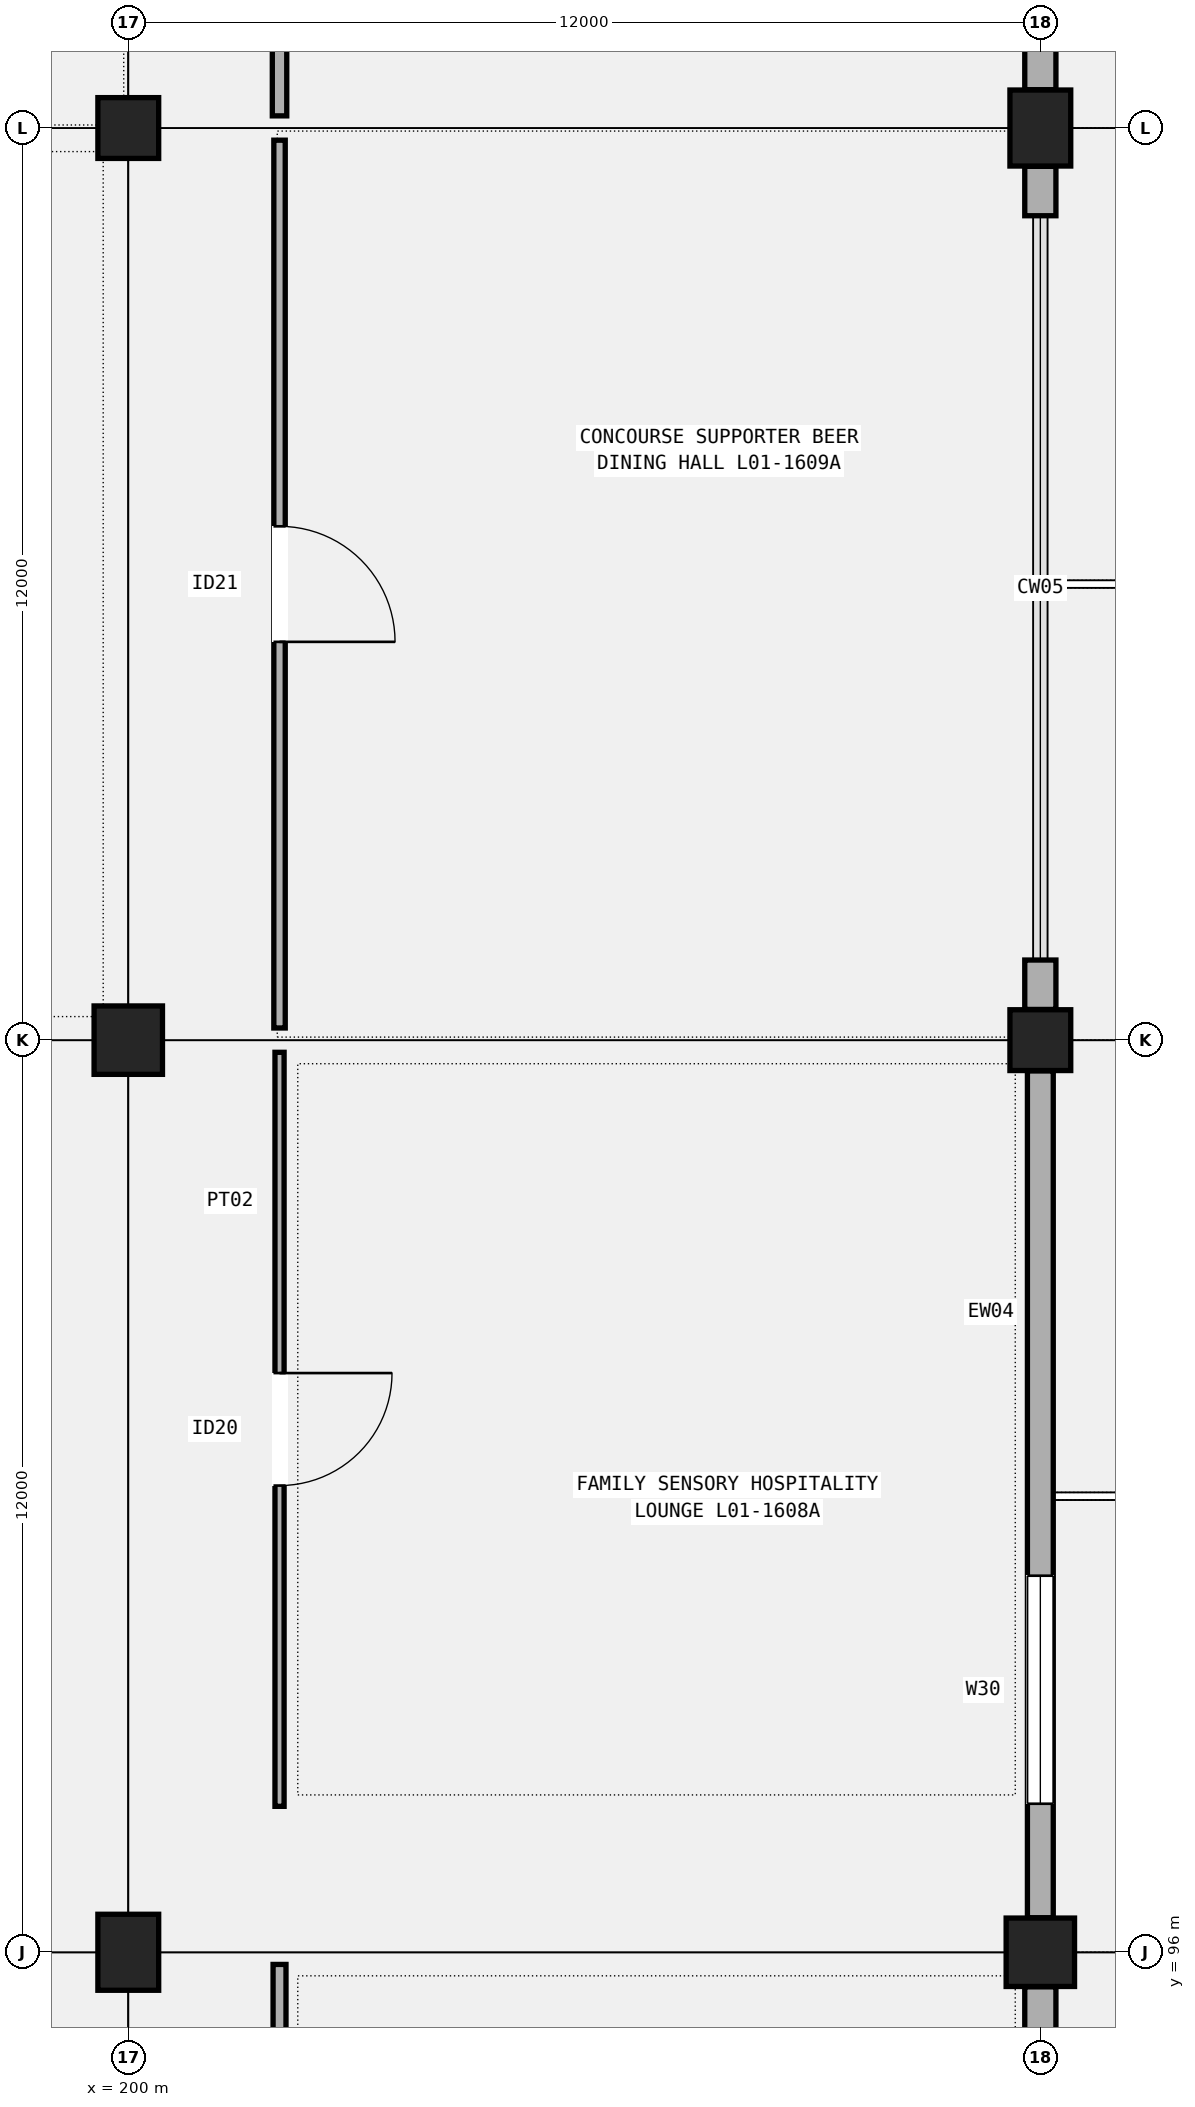
"""IFC4 building model, lengths in metres.
Left out: names, types, materials, properties, quantities, classifications, styles, units other than length and angle.
Written with IfcOpenShell. Run it as: python <this file> out.ifc"""

import sys

from ifc_helpers import new_model, si_unit, direction, frame, frame_2d, origin, origin_2d, place, context, subcontext, project, spatial, rectangle, extrude, element, fill, save


model = new_model("IFC4")
c1 = context("Model", 3, precision=1e-05, world=origin(), true_north=direction((0.0, 1.0)))
c2 = subcontext(c1, "Body", "Model", "MODEL_VIEW")
j1 = project(units=[si_unit("LENGTHUNIT", "METRE"), si_unit("PLANEANGLEUNIT", "RADIAN")], contexts=[c1])
p1 = place(None, origin())
s1 = spatial("IfcSite", under=j1, at=p1, CompositionType="ELEMENT")
p2 = place(p1, origin())
s2 = spatial("IfcBuilding", under=s1, at=p2, CompositionType="ELEMENT")
p3 = place(p2, frame((0.0, 0.0, 5.4)))
s3 = spatial("IfcBuildingStorey", under=s2, at=p3, CompositionType="ELEMENT", Elevation=5.4)
p4 = place(p3, frame((200.0, 96.0, 0.0), z_axis=(0.0, 0.0, 1.0), x_axis=(1.0, 0.0, 0.0)))
e1 = element("IfcColumn", 1, at=p4, inside=s3, PredefinedType="COLUMN", context=c2, shape_type="SweptSolid", body=[
    extrude(rectangle(XDim=0.8, YDim=1.0, at=origin_2d()), origin(), (0.0, 0.0, 1.0), 4.8),
])
p5 = place(p3, frame((200.0, 108.0, 0.0), z_axis=(0.0, 0.0, 1.0), x_axis=(1.0, 0.0, 0.0)))
e2 = element("IfcColumn", 2, at=p5, inside=s3, PredefinedType="COLUMN", context=c2, shape_type="SweptSolid", body=[
    extrude(rectangle(XDim=0.9, YDim=0.9, at=origin_2d()), origin(), (0.0, 0.0, 1.0), 4.8),
])
p6 = place(p3, frame((200.0, 120.0, 0.0), z_axis=(0.0, 0.0, 1.0), x_axis=(1.0, 0.0, 0.0)))
e3 = element("IfcColumn", 3, at=p6, inside=s3, PredefinedType="COLUMN", context=c2, shape_type="SweptSolid", body=[
    extrude(rectangle(XDim=0.8, YDim=0.8, at=origin_2d()), origin(), (0.0, 0.0, 1.0), 4.8),
])
p7 = place(p3, frame((212.0, 96.0, 0.0), z_axis=(0.0, 0.0, 1.0), x_axis=(1.0, 0.0, 0.0)))
e4 = element("IfcColumn", 4, at=p7, inside=s3, PredefinedType="COLUMN", context=c2, shape_type="SweptSolid", body=[
    extrude(rectangle(XDim=0.9, YDim=0.9, at=origin_2d()), origin(), (0.0, 0.0, 1.0), 4.8),
])
p8 = place(p3, frame((212.0, 108.0, 0.0), z_axis=(0.0, 0.0, 1.0), x_axis=(1.0, 0.0, 0.0)))
e5 = element("IfcColumn", 5, at=p8, inside=s3, PredefinedType="COLUMN", context=c2, shape_type="SweptSolid", body=[
    extrude(rectangle(XDim=0.8, YDim=0.8, at=origin_2d()), origin(), (0.0, 0.0, 1.0), 4.8),
])
p9 = place(p3, frame((212.0, 120.0, 0.0), z_axis=(0.0, 0.0, 1.0), x_axis=(1.0, 0.0, 0.0)))
e6 = element("IfcColumn", 6, at=p9, inside=s3, PredefinedType="COLUMN", context=c2, shape_type="SweptSolid", body=[
    extrude(rectangle(XDim=0.8, YDim=1.0, at=origin_2d()), origin(), (0.0, 0.0, 1.0), 4.8),
])
p10 = place(p3, frame((212.0, 94.896, 0.0), z_axis=(0.0, 0.0, 1.0), x_axis=(0.0, 1.0, 0.0)))
e7 = element("IfcWall", 7, at=p10, inside=s3, PredefinedType="SOLIDWALL", context=c2, shape_type="SweptSolid", body=[
    extrude(rectangle(XDim=0.65, YDim=0.41, at=frame_2d((0.325, 0.0))), origin(), (0.0, 0.0, 1.0), 4.15),
])
p11 = place(p3, frame((212.0, 96.454, 0.0), z_axis=(0.0, 0.0, 1.0), x_axis=(0.0, 1.0, 0.0)))
e8 = element("IfcWall", 8, at=p11, inside=s3, PredefinedType="SOLIDWALL", context=c2, shape_type="SweptSolid", body=[
    extrude(rectangle(XDim=11.142, YDim=0.34, at=frame_2d((5.571, 0.0))), origin(), (0.0, 0.0, 1.0), 4.2),
])
p12 = place(p11, frame((1.5, 0.0, 0.95)))
e9 = element("IfcOpeningElement", 9, at=p12, cuts=e8, PredefinedType="OPENING", context=c2, shape_type="SweptSolid", body=[
    extrude(rectangle(XDim=3.0, YDim=1.7, at=frame_2d((1.5, 0.85))), frame((0.0, 0.18, 0.0), z_axis=(0.0, -1.0, 0.0), x_axis=(1.0, 0.0, 0.0)), (0.0, 0.0, 1.0), 0.36),
])
p13 = place(p3, frame((212.0, 108.404, 0.0), z_axis=(0.0, 0.0, 1.0), x_axis=(0.0, 1.0, 0.0)))
e10 = element("IfcWall", 10, at=p13, inside=s3, PredefinedType="SOLIDWALL", context=c2, shape_type="SweptSolid", body=[
    extrude(rectangle(XDim=0.65, YDim=0.41, at=frame_2d((0.325, 0.0))), origin(), (0.0, 0.0, 1.0), 4.15),
])
p14 = place(p3, frame((212.0, 118.846, 0.0), z_axis=(0.0, 0.0, 1.0), x_axis=(0.0, 1.0, 0.0)))
e11 = element("IfcWall", 11, at=p14, inside=s3, PredefinedType="SOLIDWALL", context=c2, shape_type="SweptSolid", body=[
    extrude(rectangle(XDim=0.65, YDim=0.41, at=frame_2d((0.325, 0.0))), origin(), (0.0, 0.0, 1.0), 4.15),
])
p15 = place(p3, frame((212.0, 120.504, 0.0), z_axis=(0.0, 0.0, 1.0), x_axis=(0.0, 1.0, 0.0)))
e12 = element("IfcWall", 12, at=p15, inside=s3, PredefinedType="SOLIDWALL", context=c2, shape_type="SweptSolid", body=[
    extrude(rectangle(XDim=0.65, YDim=0.41, at=frame_2d((0.325, 0.0))), origin(), (0.0, 0.0, 1.0), 4.2),
])
p16 = place(p3, frame((201.99, 84.16, 0.0), z_axis=(0.0, 0.0, 1.0), x_axis=(0.0, 1.0, 0.0)))
e13 = element("IfcWall", 13, at=p16, inside=s3, PredefinedType="PARTITIONING", context=c2, shape_type="SweptSolid", body=[
    extrude(rectangle(XDim=11.68, YDim=0.17, at=frame_2d((5.84, 0.0))), origin(), (0.0, 0.0, 1.0), 3.92),
])
p17 = place(p16, frame((6.56, 0.0, 0.0), z_axis=(0.0, 0.0, 1.0), x_axis=(-1.0, 0.0, 0.0)))
e14 = element("IfcOpeningElement", 14, at=p17, cuts=e13, PredefinedType="OPENING", context=c2, shape_type="SweptSolid", body=[
    extrude(rectangle(XDim=1.44, YDim=2.26, at=frame_2d((0.72, 1.13))), frame((0.0, 0.095, 0.0), z_axis=(0.0, -1.0, 0.0), x_axis=(1.0, 0.0, 0.0)), (0.0, 0.0, 1.0), 0.19),
])
p18 = place(p3, frame((201.99, 97.92, 0.0), z_axis=(0.0, 0.0, 1.0), x_axis=(0.0, 1.0, 0.0)))
e15 = element("IfcWall", 15, at=p18, inside=s3, PredefinedType="PARTITIONING", context=c2, shape_type="SweptSolid", body=[
    extrude(rectangle(XDim=9.92, YDim=0.12, at=frame_2d((4.96, 0.0))), origin(), (0.0, 0.0, 1.0), 3.92),
])
p19 = place(p18, frame((5.7, 0.0, 0.0), z_axis=(0.0, 0.0, 1.0), x_axis=(-1.0, 0.0, 0.0)))
e16 = element("IfcOpeningElement", 16, at=p19, cuts=e15, PredefinedType="OPENING", context=c2, shape_type="SweptSolid", body=[
    extrude(rectangle(XDim=1.48, YDim=2.24, at=frame_2d((0.74, 1.12))), frame((0.0, 0.07, 0.0), z_axis=(0.0, -1.0, 0.0), x_axis=(1.0, 0.0, 0.0)), (0.0, 0.0, 1.0), 0.14),
])
p20 = place(p3, frame((201.99, 108.16, 0.0), z_axis=(0.0, 0.0, 1.0), x_axis=(0.0, 1.0, 0.0)))
e17 = element("IfcWall", 17, at=p20, inside=s3, PredefinedType="PARTITIONING", context=c2, shape_type="SweptSolid", body=[
    extrude(rectangle(XDim=11.68, YDim=0.15, at=frame_2d((5.84, 0.0))), origin(), (0.0, 0.0, 1.0), 3.92),
])
p21 = place(p20, frame((6.6, 0.0, 0.0), z_axis=(0.0, 0.0, 1.0), x_axis=(-1.0, 0.0, 0.0)))
e18 = element("IfcOpeningElement", 18, at=p21, cuts=e17, PredefinedType="OPENING", context=c2, shape_type="SweptSolid", body=[
    extrude(rectangle(XDim=1.52, YDim=2.28, at=frame_2d((0.76, 1.14))), frame((0.0, 0.085, 0.0), z_axis=(0.0, -1.0, 0.0), x_axis=(1.0, 0.0, 0.0)), (0.0, 0.0, 1.0), 0.17),
])
p22 = place(p3, frame((201.99, 120.16, 0.0), z_axis=(0.0, 0.0, 1.0), x_axis=(0.0, 1.0, 0.0)))
e19 = element("IfcWall", 19, at=p22, inside=s3, PredefinedType="PARTITIONING", context=c2, shape_type="SweptSolid", body=[
    extrude(rectangle(XDim=11.698, YDim=0.19, at=frame_2d((5.849, 0.0))), origin(), (0.0, 0.0, 1.0), 3.92),
])
p23 = place(p22, frame((3.719, 0.0, 0.0), z_axis=(0.0, 0.0, 1.0), x_axis=(-1.0, 0.0, 0.0)))
e20 = element("IfcOpeningElement", 20, at=p23, cuts=e19, PredefinedType="OPENING", context=c2, shape_type="SweptSolid", body=[
    extrude(rectangle(XDim=1.56, YDim=2.26, at=frame_2d((0.78, 1.13))), frame((0.0, 0.105, 0.0), z_axis=(0.0, -1.0, 0.0), x_axis=(1.0, 0.0, 0.0)), (0.0, 0.0, 1.0), 0.21),
])
p24 = place(p22, frame((9.658, 0.0, 0.0), z_axis=(0.0, 0.0, 1.0), x_axis=(-1.0, 0.0, 0.0)))
e21 = element("IfcOpeningElement", 21, at=p24, cuts=e19, PredefinedType="OPENING", context=c2, shape_type="SweptSolid", body=[
    extrude(rectangle(XDim=1.6, YDim=2.3, at=frame_2d((0.8, 1.15))), frame((0.0, 0.105, 0.0), z_axis=(0.0, -1.0, 0.0), x_axis=(1.0, 0.0, 0.0)), (0.0, 0.0, 1.0), 0.21),
])
p25 = place(p12, origin())
e22 = element("IfcWindow", 22, at=p25, inside=s3, PartitioningType="SINGLE_PANEL", PredefinedType="WINDOW", context=c2, shape_type="SweptSolid", body=[
    extrude(rectangle(XDim=3.0, YDim=1.7, at=frame_2d((1.5, 0.85))), frame((0.0, 0.03, 0.0), z_axis=(0.0, -1.0, 0.0), x_axis=(1.0, 0.0, 0.0)), (0.0, 0.0, 1.0), 0.06),
])
fill(e9, e22)
p26 = place(p19, origin())
e23 = element("IfcDoor", 23, at=p26, inside=s3, OperationType="SINGLE_SWING_LEFT", PredefinedType="DOOR", context=c2, shape_type="SweptSolid", body=[
    extrude(rectangle(XDim=1.48, YDim=2.24, at=frame_2d((0.74, 1.12))), frame((0.0, 0.025, 0.0), z_axis=(0.0, -1.0, 0.0), x_axis=(1.0, 0.0, 0.0)), (0.0, 0.0, 1.0), 0.05),
])
fill(e16, e23)
p27 = place(p21, origin())
e24 = element("IfcDoor", 24, at=p27, inside=s3, OperationType="SINGLE_SWING_RIGHT", PredefinedType="DOOR", context=c2, shape_type="SweptSolid", body=[
    extrude(rectangle(XDim=1.52, YDim=2.28, at=frame_2d((0.76, 1.14))), frame((0.0, 0.025, 0.0), z_axis=(0.0, -1.0, 0.0), x_axis=(1.0, 0.0, 0.0)), (0.0, 0.0, 1.0), 0.05),
])
fill(e18, e24)
save(model, sys.argv[1])
